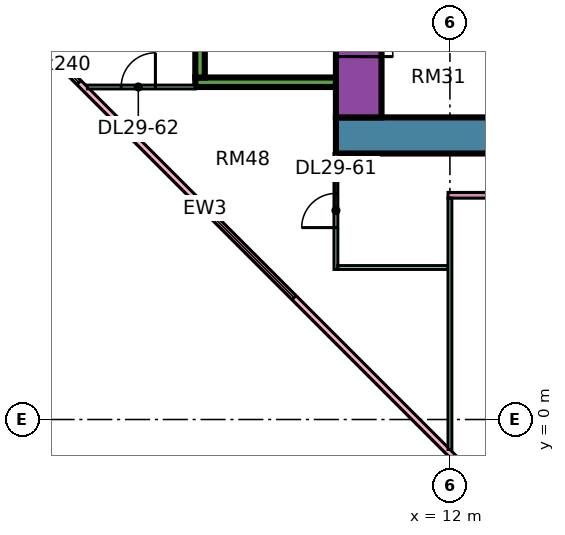
"""IFC4 building model, lengths in metres.
Left out: names, types, materials, properties, quantities, classifications, styles, units other than length and angle.
Written with IfcOpenShell. Run it as: python <this file> out.ifc"""

import sys

from ifc_helpers import new_model, si_unit, direction, frame, frame_2d, origin, place, context, subcontext, project, spatial, rectangle, extrude, element, fill, save


model = new_model("IFC4")
c1 = context("Model", 3, precision=1e-05, world=origin(), true_north=direction((0.0, 1.0)))
c2 = subcontext(c1, "Body", "Model", "MODEL_VIEW")
j1 = project(units=[si_unit("LENGTHUNIT", "METRE"), si_unit("PLANEANGLEUNIT", "RADIAN")], contexts=[c1])
p1 = place(None, origin())
s1 = spatial("IfcSite", under=j1, at=p1, CompositionType="ELEMENT")
p2 = place(p1, origin())
s2 = spatial("IfcBuilding", under=s1, at=p2, CompositionType="ELEMENT")
p3 = place(p2, frame((0.0, 0.0, 125.65)))
s3 = spatial("IfcBuildingStorey", under=s2, at=p3, CompositionType="ELEMENT", Elevation=125.65)
p4 = place(p3, frame((9.0, 7.475, 0.0), z_axis=(0.0, 0.0, 1.0), x_axis=(1.0, 0.0, 0.0)))
e1 = element("IfcWall", 1, at=p4, inside=s3, PredefinedType="SHEAR", context=c2, shape_type="SweptSolid", body=[
    extrude(rectangle(XDim=25.0, YDim=0.95, at=frame_2d((12.5, 0.0))), origin(), (0.0, 0.0, 1.0), 3.75),
])
p5 = place(p3, frame((9.6, 7.95, 0.0), z_axis=(0.0, 0.0, 1.0), x_axis=(0.0, 1.0, 0.0)))
e2 = element("IfcWall", 2, at=p5, inside=s3, PredefinedType="SHEAR", context=c2, shape_type="SweptSolid", body=[
    extrude(rectangle(XDim=11.1, YDim=1.2, at=frame_2d((5.55, 0.0))), origin(), (0.0, 0.0, 1.0), 3.75),
])
p6 = place(p5, frame((3.925, 0.0, 0.0)))
e3 = element("IfcOpeningElement", 3, at=p6, cuts=e2, PredefinedType="OPENING", context=c2, shape_type="SweptSolid", body=[
    extrude(rectangle(XDim=1.1, YDim=2.2, at=frame_2d((0.55, 1.1))), frame((0.0, 0.61, 0.0), z_axis=(0.0, -1.0, 0.0), x_axis=(1.0, 0.0, 0.0)), (0.0, 0.0, 1.0), 1.22),
])
p7 = place(p5, frame((6.425, 0.0, 0.0)))
e4 = element("IfcOpeningElement", 4, at=p7, cuts=e2, PredefinedType="OPENING", context=c2, shape_type="SweptSolid", body=[
    extrude(rectangle(XDim=1.1, YDim=2.2, at=frame_2d((0.55, 1.1))), frame((0.0, 0.61, 0.0), z_axis=(0.0, -1.0, 0.0), x_axis=(1.0, 0.0, 0.0)), (0.0, 0.0, 1.0), 1.22),
])
p8 = place(p5, frame((9.175, 0.0, 0.0)))
e5 = element("IfcOpeningElement", 5, at=p8, cuts=e2, PredefinedType="OPENING", context=c2, shape_type="SweptSolid", body=[
    extrude(rectangle(XDim=1.1, YDim=2.2, at=frame_2d((0.55, 1.1))), frame((0.0, 0.61, 0.0), z_axis=(0.0, -1.0, 0.0), x_axis=(1.0, 0.0, 0.0)), (0.0, 0.0, 1.0), 1.22),
])
p9 = place(p5, frame((1.6, 0.0, 0.0)))
e6 = element("IfcOpeningElement", 6, at=p9, cuts=e2, PredefinedType="OPENING", context=c2, shape_type="SweptSolid", body=[
    extrude(rectangle(XDim=0.9, YDim=2.1, at=frame_2d((0.45, 1.05))), frame((0.0, 0.61, 0.0), z_axis=(0.0, -1.0, 0.0), x_axis=(1.0, 0.0, 0.0)), (0.0, 0.0, 1.0), 1.22),
])
p10 = place(p3, frame((5.3, 8.875, 0.0), z_axis=(0.0, 0.0, 1.0), x_axis=(1.0, 0.0, 0.0)))
e7 = element("IfcWall", 7, at=p10, inside=s3, PredefinedType="SHEAR", context=c2, shape_type="SweptSolid", body=[
    extrude(rectangle(XDim=3.7, YDim=0.25, at=frame_2d((1.85, 0.0))), origin(), (0.0, 0.0, 1.0), 3.75),
])
p11 = place(p3, frame((5.425, 9.0, 0.0), z_axis=(0.0, 0.0, 1.0), x_axis=(0.0, 1.0, 0.0)))
e8 = element("IfcWall", 8, at=p11, inside=s3, PredefinedType="SHEAR", context=c2, shape_type="SweptSolid", body=[
    extrude(rectangle(XDim=4.0, YDim=0.25, at=frame_2d((2.0, 0.0))), origin(), (0.0, 0.0, 1.0), 3.75),
])
p12 = place(p3, frame((-1.447, 12.553, 0.0), z_axis=(0.0, 0.0, 1.0), x_axis=(0.707106781187, -0.707106781187, 0.0)))
e9 = element("IfcWall", 9, at=p12, inside=s3, PredefinedType="SOLIDWALL", context=c2, shape_type="SweptSolid", body=[
    extrude(rectangle(XDim=19.799, YDim=0.15, at=frame_2d((9.899, 0.0))), origin(), (0.0, 0.0, 1.0), 3.35),
])
p13 = place(p12, frame((2.212, 0.0, 0.45)))
e10 = element("IfcOpeningElement", 10, at=p13, cuts=e9, PredefinedType="OPENING", context=c2, shape_type="SweptSolid", body=[
    extrude(rectangle(XDim=3.0, YDim=2.4, at=frame_2d((1.5, 1.2))), frame((0.0, 0.085, 0.0), z_axis=(0.0, -1.0, 0.0), x_axis=(1.0, 0.0, 0.0)), (0.0, 0.0, 1.0), 0.17),
])
p14 = place(p12, frame((10.216, 0.0, 0.45)))
e11 = element("IfcOpeningElement", 11, at=p14, cuts=e9, PredefinedType="OPENING", context=c2, shape_type="SweptSolid", body=[
    extrude(rectangle(XDim=3.0, YDim=2.4, at=frame_2d((1.5, 1.2))), frame((0.0, 0.085, 0.0), z_axis=(0.0, -1.0, 0.0), x_axis=(1.0, 0.0, 0.0)), (0.0, 0.0, 1.0), 0.17),
])
p15 = place(p3, frame((2.461, 8.75, 0.0), z_axis=(0.0, 0.0, 1.0), x_axis=(1.0, 0.0, 0.0)))
e12 = element("IfcWall", 12, at=p15, inside=s3, PredefinedType="PARTITIONING", context=c2, shape_type="SweptSolid", body=[
    extrude(rectangle(XDim=2.839, YDim=0.1, at=frame_2d((1.419, 0.0))), origin(), (0.0, 0.0, 1.0), 3.35),
])
p16 = place(p15, frame((0.889, 0.0, 0.0)))
e13 = element("IfcOpeningElement", 13, at=p16, cuts=e12, PredefinedType="OPENING", context=c2, shape_type="SweptSolid", body=[
    extrude(rectangle(XDim=0.9, YDim=2.1, at=frame_2d((0.45, 1.05))), frame((0.0, 0.06, 0.0), z_axis=(0.0, -1.0, 0.0), x_axis=(1.0, 0.0, 0.0)), (0.0, 0.0, 1.0), 0.12),
])
p17 = place(p3, frame((9.0, 3.95, 0.0), z_axis=(0.0, 0.0, 1.0), x_axis=(0.0, 1.0, 0.0)))
e14 = element("IfcWall", 14, at=p17, inside=s3, PredefinedType="PARTITIONING", context=c2, shape_type="SweptSolid", body=[
    extrude(rectangle(XDim=3.05, YDim=0.1, at=frame_2d((1.525, 0.0))), origin(), (0.0, 0.0, 1.0), 3.35),
])
p18 = place(p17, frame((1.1, 0.0, 0.0)))
e15 = element("IfcOpeningElement", 15, at=p18, cuts=e14, PredefinedType="OPENING", context=c2, shape_type="SweptSolid", body=[
    extrude(rectangle(XDim=0.9, YDim=2.1, at=frame_2d((0.45, 1.05))), frame((0.0, 0.06, 0.0), z_axis=(0.0, -1.0, 0.0), x_axis=(1.0, 0.0, 0.0)), (0.0, 0.0, 1.0), 0.12),
])
p19 = place(p3, frame((9.05, 4.0, 0.0), z_axis=(0.0, 0.0, 1.0), x_axis=(1.0, 0.0, 0.0)))
e16 = element("IfcWall", 16, at=p19, inside=s3, PredefinedType="PARTITIONING", context=c2, shape_type="SweptSolid", body=[
    extrude(rectangle(XDim=2.9, YDim=0.1, at=frame_2d((1.45, 0.0))), origin(), (0.0, 0.0, 1.0), 3.35),
])
p20 = place(p3, frame((11.95, 5.9, 0.0), z_axis=(0.0, 0.0, 1.0), x_axis=(1.0, 0.0, 0.0)))
e17 = element("IfcWall", 17, at=p20, inside=s3, PredefinedType="PARTITIONING", context=c2, shape_type="SweptSolid", body=[
    extrude(rectangle(XDim=21.1, YDim=0.15, at=frame_2d((10.55, 0.0))), origin(), (0.0, 0.0, 1.0), 3.35),
])
p21 = place(p20, frame((16.1, 0.0, 0.0)))
e18 = element("IfcOpeningElement", 18, at=p21, cuts=e17, PredefinedType="OPENING", context=c2, shape_type="SweptSolid", body=[
    extrude(rectangle(XDim=0.9, YDim=2.1, at=frame_2d((0.45, 1.05))), frame((0.0, 0.085, 0.0), z_axis=(0.0, -1.0, 0.0), x_axis=(1.0, 0.0, 0.0)), (0.0, 0.0, 1.0), 0.17),
])
p22 = place(p20, frame((13.1, 0.0, 0.0)))
e19 = element("IfcOpeningElement", 19, at=p22, cuts=e17, PredefinedType="OPENING", context=c2, shape_type="SweptSolid", body=[
    extrude(rectangle(XDim=0.9, YDim=2.1, at=frame_2d((0.45, 1.05))), frame((0.0, 0.085, 0.0), z_axis=(0.0, -1.0, 0.0), x_axis=(1.0, 0.0, 0.0)), (0.0, 0.0, 1.0), 0.17),
])
p23 = place(p20, frame((4.1, 0.0, 0.0)))
e20 = element("IfcOpeningElement", 20, at=p23, cuts=e17, PredefinedType="OPENING", context=c2, shape_type="SweptSolid", body=[
    extrude(rectangle(XDim=0.9, YDim=2.1, at=frame_2d((0.45, 1.05))), frame((0.0, 0.085, 0.0), z_axis=(0.0, -1.0, 0.0), x_axis=(1.0, 0.0, 0.0)), (0.0, 0.0, 1.0), 0.17),
])
p24 = place(p3, frame((12.0, -0.788, 0.0), z_axis=(0.0, 0.0, 1.0), x_axis=(0.0, 1.0, 0.0)))
e21 = element("IfcWall", 21, at=p24, inside=s3, PredefinedType="PARTITIONING", context=c2, shape_type="SweptSolid", body=[
    extrude(rectangle(XDim=6.613, YDim=0.1, at=frame_2d((3.306, 0.0))), origin(), (0.0, 0.0, 1.0), 3.35),
])
p25 = place(p13, origin())
e22 = element("IfcWindow", 22, at=p25, inside=s3, PartitioningType="SINGLE_PANEL", PredefinedType="WINDOW", context=c2, shape_type="SweptSolid", body=[
    extrude(rectangle(XDim=3.0, YDim=2.4, at=frame_2d((1.5, 1.2))), frame((0.0, 0.03, 0.0), z_axis=(0.0, -1.0, 0.0), x_axis=(1.0, 0.0, 0.0)), (0.0, 0.0, 1.0), 0.06),
])
fill(e10, e22)
p26 = place(p14, origin())
e23 = element("IfcWindow", 23, at=p26, inside=s3, PartitioningType="SINGLE_PANEL", PredefinedType="WINDOW", context=c2, shape_type="SweptSolid", body=[
    extrude(rectangle(XDim=3.0, YDim=2.4, at=frame_2d((1.5, 1.2))), frame((0.0, 0.03, 0.0), z_axis=(0.0, -1.0, 0.0), x_axis=(1.0, 0.0, 0.0)), (0.0, 0.0, 1.0), 0.06),
])
fill(e11, e23)
p27 = place(p9, frame((0.9, 0.0, 0.0), z_axis=(0.0, 0.0, 1.0), x_axis=(-1.0, 0.0, 0.0)))
e24 = element("IfcDoor", 24, at=p27, inside=s3, OperationType="SINGLE_SWING_LEFT", PredefinedType="DOOR", context=c2, shape_type="SweptSolid", body=[
    extrude(rectangle(XDim=0.9, YDim=2.1, at=frame_2d((0.45, 1.05))), frame((0.0, 0.025, 0.0), z_axis=(0.0, -1.0, 0.0), x_axis=(1.0, 0.0, 0.0)), (0.0, 0.0, 1.0), 0.05),
])
fill(e6, e24)
p28 = place(p18, origin())
e25 = element("IfcDoor", 25, at=p28, inside=s3, OperationType="SINGLE_SWING_LEFT", PredefinedType="DOOR", context=c2, shape_type="SweptSolid", body=[
    extrude(rectangle(XDim=0.9, YDim=2.1, at=frame_2d((0.45, 1.05))), frame((0.0, 0.025, 0.0), z_axis=(0.0, -1.0, 0.0), x_axis=(1.0, 0.0, 0.0)), (0.0, 0.0, 1.0), 0.05),
])
fill(e15, e25)
p29 = place(p16, frame((0.9, 0.0, 0.0), z_axis=(0.0, 0.0, 1.0), x_axis=(-1.0, 0.0, 0.0)))
e26 = element("IfcDoor", 26, at=p29, inside=s3, OperationType="SINGLE_SWING_RIGHT", PredefinedType="DOOR", context=c2, shape_type="SweptSolid", body=[
    extrude(rectangle(XDim=0.9, YDim=2.1, at=frame_2d((0.45, 1.05))), frame((0.0, 0.025, 0.0), z_axis=(0.0, -1.0, 0.0), x_axis=(1.0, 0.0, 0.0)), (0.0, 0.0, 1.0), 0.05),
])
fill(e13, e26)
save(model, sys.argv[1])
